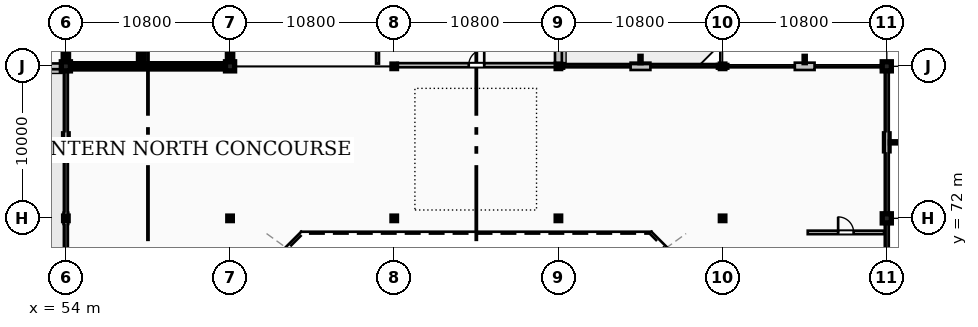
"""IFC4 building model, lengths in metres.
Left out: names, types, materials, properties, quantities, classifications, styles, units other than length and angle.
Written with IfcOpenShell. Run it as: python <this file> out.ifc"""

import sys

from ifc_helpers import new_model, si_unit, direction, frame, frame_2d, origin, origin_2d, place, context, subcontext, project, spatial, rectangle, hollow_rectangle, extrude, element, fill, save


model = new_model("IFC4")
c1 = context("Model", 3, precision=1e-05, world=origin(), true_north=direction((0.0, 1.0)))
c2 = subcontext(c1, "Body", "Model", "MODEL_VIEW")
j1 = project(units=[si_unit("LENGTHUNIT", "METRE"), si_unit("PLANEANGLEUNIT", "RADIAN")], contexts=[c1])
p1 = place(None, origin())
s1 = spatial("IfcSite", under=j1, at=p1, CompositionType="ELEMENT")
p2 = place(p1, origin())
s2 = spatial("IfcBuilding", under=s1, at=p2, CompositionType="ELEMENT")
p3 = place(p2, frame((0.0, 0.0, 24.0)))
s3 = spatial("IfcBuildingStorey", under=s2, at=p3, CompositionType="ELEMENT", Elevation=24.0)
p4 = place(p3, frame((54.0, 72.0, 0.0), z_axis=(0.0, 0.0, 1.0), x_axis=(1.0, 0.0, 0.0)))
e1 = element("IfcColumn", 1, at=p4, inside=s3, PredefinedType="COLUMN", context=c2, shape_type="SweptSolid", body=[
    extrude(hollow_rectangle(XDim=0.3, YDim=0.3, WallThickness=0.016, InnerFilletRadius=0.016, OuterFilletRadius=0.032, at=origin_2d()), origin(), (0.0, 0.0, 1.0), 4.8),
])
p5 = place(p3, frame((54.0, 82.0, 0.0), z_axis=(0.0, 0.0, 1.0), x_axis=(1.0, 0.0, 0.0)))
e2 = element("IfcColumn", 2, at=p5, inside=s3, PredefinedType="COLUMN", context=c2, shape_type="SweptSolid", body=[
    extrude(rectangle(XDim=0.6, YDim=0.6, at=origin_2d()), origin(), (0.0, 0.0, 1.0), 4.8),
])
p6 = place(p3, frame((64.8, 72.0, 0.0), z_axis=(0.0, 0.0, 1.0), x_axis=(1.0, 0.0, 0.0)))
e3 = element("IfcColumn", 3, at=p6, inside=s3, PredefinedType="COLUMN", context=c2, shape_type="SweptSolid", body=[
    extrude(hollow_rectangle(XDim=0.3, YDim=0.3, WallThickness=0.016, InnerFilletRadius=0.016, OuterFilletRadius=0.032, at=origin_2d()), origin(), (0.0, 0.0, 1.0), 4.8),
])
p7 = place(p3, frame((64.8, 82.0, 0.0), z_axis=(0.0, 0.0, 1.0), x_axis=(1.0, 0.0, 0.0)))
e4 = element("IfcColumn", 4, at=p7, inside=s3, PredefinedType="COLUMN", context=c2, shape_type="SweptSolid", body=[
    extrude(rectangle(XDim=0.6, YDim=0.6, at=origin_2d()), origin(), (0.0, 0.0, 1.0), 4.8),
])
for number, where, z_axis, x_axis in (
    (5, (75.6, 72.0, 0.0), (0.0, 0.0, 1.0), (1.0, 0.0, 0.0)),
    (6, (75.6, 82.0, 0.0), (0.0, 0.0, 1.0), (1.0, 0.0, 0.0)),
    (7, (86.4, 72.0, 0.0), (0.0, 0.0, 1.0), (1.0, 0.0, 0.0)),
    (8, (86.4, 82.0, 0.0), (0.0, 0.0, 1.0), (1.0, 0.0, 0.0)),
    (9, (97.2, 72.0, 0.0), (0.0, 0.0, 1.0), (1.0, 0.0, 0.0)),
    (10, (97.2, 82.0, 0.0), (0.0, 0.0, 1.0), (1.0, 0.0, 0.0)),
):
    element("IfcColumn", number, at=place(p3, frame(where, z_axis=z_axis, x_axis=x_axis)), inside=s3, PredefinedType="COLUMN", context=c2, shape_type="SweptSolid", body=[
        extrude(hollow_rectangle(XDim=0.3, YDim=0.3, WallThickness=0.016, InnerFilletRadius=0.016, OuterFilletRadius=0.032, at=origin_2d()), origin(), (0.0, 0.0, 1.0), 4.8),
    ])
for number, where, z_axis, x_axis in (
    (11, (108.0, 72.0, 0.0), (0.0, 0.0, 1.0), (1.0, 0.0, 0.0)),
    (12, (108.0, 82.0, 0.0), (0.0, 0.0, 1.0), (1.0, 0.0, 0.0)),
):
    element("IfcColumn", number, at=place(p3, frame(where, z_axis=z_axis, x_axis=x_axis)), inside=s3, PredefinedType="COLUMN", context=c2, shape_type="SweptSolid", body=[
        extrude(rectangle(XDim=0.6, YDim=0.6, at=origin_2d()), origin(), (0.0, 0.0, 1.0), 4.8),
    ])
p8 = place(p3, frame((103.25, 82.0, 0.0), z_axis=(0.0, 0.0, 1.0), x_axis=(-1.0, 0.0, 0.0)))
e13 = element("IfcWall", 13, at=p8, inside=s3, PredefinedType="STANDARD", context=c2, shape_type="SweptSolid", body=[
    extrude(rectangle(XDim=1.3, YDim=0.48, at=frame_2d((0.65, 0.0))), origin(), (0.0, 0.0, 1.0), 4.109),
])
for number, where, z_axis, x_axis in (
    (14, (107.855, 82.0, 0.0), (0.0, 0.0, 1.0), (-1.0, 0.0, 0.0)),
    (15, (97.57, 82.0, 0.0), (0.0, 0.0, 1.0), (-1.0, 0.0, 0.0)),
):
    element("IfcWall", number, at=place(p3, frame(where, z_axis=z_axis, x_axis=x_axis)), inside=s3, PredefinedType="STANDARD", context=c2, shape_type="SweptSolid", body=[
        extrude(rectangle(XDim=0.225, YDim=0.3, at=frame_2d((0.113, 0.0))), origin(), (0.0, 0.0, 1.0), 4.56),
    ])
p9 = place(p3, frame((92.45, 82.0, 0.0), z_axis=(0.0, 0.0, 1.0), x_axis=(-1.0, 0.0, 0.0)))
e16 = element("IfcWall", 16, at=p9, inside=s3, PredefinedType="STANDARD", context=c2, shape_type="SweptSolid", body=[
    extrude(rectangle(XDim=1.3, YDim=0.48, at=frame_2d((0.65, 0.0))), origin(), (0.0, 0.0, 1.0), 4.109),
])
p10 = place(p3, frame((97.055, 82.0, 0.0), z_axis=(0.0, 0.0, 1.0), x_axis=(-1.0, 0.0, 0.0)))
e17 = element("IfcWall", 17, at=p10, inside=s3, PredefinedType="STANDARD", context=c2, shape_type="SweptSolid", body=[
    extrude(rectangle(XDim=0.225, YDim=0.3, at=frame_2d((0.112, 0.0))), origin(), (0.0, 0.0, 1.0), 4.56),
])
p11 = place(p3, frame((86.77, 82.0, 0.0), z_axis=(0.0, 0.0, 1.0), x_axis=(-1.0, 0.0, 0.0)))
e18 = element("IfcWall", 18, at=p11, inside=s3, PredefinedType="STANDARD", context=c2, shape_type="SweptSolid", body=[
    extrude(rectangle(XDim=0.225, YDim=0.3, at=frame_2d((0.113, 0.0))), origin(), (0.0, 0.0, 1.0), 4.56),
])
p12 = place(p3, frame((86.4, 82.145, 0.0), z_axis=(0.0, 0.0, 1.0), x_axis=(0.0, 1.0, 0.0)))
e19 = element("IfcWall", 19, at=p12, inside=s3, PredefinedType="STANDARD", context=c2, shape_type="SweptSolid", body=[
    extrude(rectangle(XDim=9.71, YDim=0.45, at=frame_2d((4.855, 0.0))), origin(), (0.0, 0.0, 1.0), 4.56),
])
p13 = place(p12, frame((4.255, 0.0, 0.0)))
e20 = element("IfcOpeningElement", 20, at=p13, cuts=e19, PredefinedType="OPENING", context=c2, shape_type="SweptSolid", body=[
    extrude(rectangle(XDim=1.2, YDim=2.3, at=frame_2d((0.6, 1.15))), frame((0.0, 0.235, 0.0), z_axis=(0.0, -1.0, 0.0), x_axis=(1.0, 0.0, 0.0)), (0.0, 0.0, 1.0), 0.47),
])
p14 = place(p3, frame((43.345, 82.0, 0.0), z_axis=(0.0, 0.0, 1.0), x_axis=(1.0, 0.0, 0.0)))
e21 = element("IfcWall", 21, at=p14, inside=s3, PredefinedType="STANDARD", context=c2, shape_type="SweptSolid", body=[
    extrude(rectangle(XDim=10.51, YDim=0.38, at=frame_2d((5.255, 0.0))), origin(), (0.0, 0.0, 1.0), 4.17),
])
p15 = place(p14, frame((3.655, 0.0, 1.0)))
e22 = element("IfcOpeningElement", 22, at=p15, cuts=e21, PredefinedType="OPENING", context=c2, shape_type="SweptSolid", body=[
    extrude(rectangle(XDim=3.2, YDim=2.5, at=frame_2d((1.6, 1.25))), frame((0.0, 0.2, 0.0), z_axis=(0.0, -1.0, 0.0), x_axis=(1.0, 0.0, 0.0)), (0.0, 0.0, 1.0), 0.4),
])
p16 = place(p3, frame((54.0, 77.65, 0.0), z_axis=(0.0, 0.0, 1.0), x_axis=(0.0, -1.0, 0.0)))
e23 = element("IfcWall", 23, at=p16, inside=s3, PredefinedType="STANDARD", context=c2, shape_type="SweptSolid", body=[
    extrude(rectangle(XDim=1.3, YDim=0.48, at=frame_2d((0.65, 0.0))), origin(), (0.0, 0.0, 1.0), 4.109),
])
for number, where, z_axis, x_axis in (
    (24, (54.0, 81.855, 0.0), (0.0, 0.0, 1.0), (0.0, -1.0, 0.0)),
    (25, (54.0, 72.37, 0.0), (0.0, 0.0, 1.0), (0.0, -1.0, 0.0)),
    (26, (54.0, 71.855, 0.0), (0.0, 0.0, 1.0), (0.0, -1.0, 0.0)),
    (27, (108.0, 71.63, 0.0), (0.0, 0.0, 1.0), (0.0, 1.0, 0.0)),
):
    element("IfcWall", number, at=place(p3, frame(where, z_axis=z_axis, x_axis=x_axis)), inside=s3, PredefinedType="STANDARD", context=c2, shape_type="SweptSolid", body=[
        extrude(rectangle(XDim=0.225, YDim=0.3, at=frame_2d((0.113, 0.0))), origin(), (0.0, 0.0, 1.0), 4.56),
    ])
p17 = place(p3, frame((108.0, 76.35, 0.0), z_axis=(0.0, 0.0, 1.0), x_axis=(0.0, 1.0, 0.0)))
e28 = element("IfcWall", 28, at=p17, inside=s3, PredefinedType="STANDARD", context=c2, shape_type="SweptSolid", body=[
    extrude(rectangle(XDim=1.3, YDim=0.48, at=frame_2d((0.65, 0.0))), origin(), (0.0, 0.0, 1.0), 4.109),
])
for number, where, z_axis, x_axis in (
    (29, (108.0, 72.145, 0.0), (0.0, 0.0, 1.0), (0.0, 1.0, 0.0)),
    (30, (108.0, 81.63, 0.0), (0.0, 0.0, 1.0), (0.0, 1.0, 0.0)),
):
    element("IfcWall", number, at=place(p3, frame(where, z_axis=z_axis, x_axis=x_axis)), inside=s3, PredefinedType="STANDARD", context=c2, shape_type="SweptSolid", body=[
        extrude(rectangle(XDim=0.225, YDim=0.3, at=frame_2d((0.113, 0.0))), origin(), (0.0, 0.0, 1.0), 4.56),
    ])
for number, where, z_axis, x_axis in (
    (31, (54.0, 40.35, 4.6), (0.0, 0.0, 1.0), (0.0, 1.0, 0.0)),
    (32, (108.0, 40.35, 4.6), (0.0, 0.0, 1.0), (0.0, 1.0, 0.0)),
):
    element("IfcWall", number, at=place(p3, frame(where, z_axis=z_axis, x_axis=x_axis)), inside=s3, PredefinedType="PARAPET", context=c2, shape_type="SweptSolid", body=[
        extrude(rectangle(XDim=41.3, YDim=0.26, at=frame_2d((20.65, 0.0))), origin(), (0.0, 0.0, 1.0), 0.55),
    ])
p18 = place(p3, frame((54.3, 82.0, 0.0), z_axis=(0.0, 0.0, 1.0), x_axis=(1.0, 0.0, 0.0)))
e33 = element("IfcWall", 33, at=p18, inside=s3, PredefinedType="SHEAR", context=c2, shape_type="SweptSolid", body=[
    extrude(rectangle(XDim=10.2, YDim=0.35, at=frame_2d((5.1, 0.0))), origin(), (0.0, 0.0, 1.0), 4.56),
])
p19 = place(p3, frame((54.0, 82.3, 0.0), z_axis=(0.0, 0.0, 1.0), x_axis=(0.0, 1.0, 0.0)))
e34 = element("IfcWall", 34, at=p19, inside=s3, PredefinedType="SHEAR", context=c2, shape_type="SweptSolid", body=[
    extrude(rectangle(XDim=9.4, YDim=0.35, at=frame_2d((4.7, 0.0))), origin(), (0.0, 0.0, 1.0), 4.56),
])
p20 = place(p3, frame((64.8, 82.3, 0.0), z_axis=(0.0, 0.0, 1.0), x_axis=(0.0, 1.0, 0.0)))
e35 = element("IfcWall", 35, at=p20, inside=s3, PredefinedType="SHEAR", context=c2, shape_type="SweptSolid", body=[
    extrude(rectangle(XDim=9.4, YDim=0.35, at=frame_2d((4.7, 0.0))), origin(), (0.0, 0.0, 1.0), 4.56),
])
p21 = place(p20, frame((0.88, 0.0, 0.0)))
e36 = element("IfcOpeningElement", 36, at=p21, cuts=e35, PredefinedType="OPENING", context=c2, shape_type="SweptSolid", body=[
    extrude(rectangle(XDim=1.8, YDim=2.25, at=frame_2d((0.9, 1.125))), frame((0.0, 0.185, 0.0), z_axis=(0.0, -1.0, 0.0), x_axis=(1.0, 0.0, 0.0)), (0.0, 0.0, 1.0), 0.37),
])
p22 = place(p3, frame((58.95, 82.175, 0.0), z_axis=(0.0, 0.0, 1.0), x_axis=(0.0, 1.0, 0.0)))
e37 = element("IfcWall", 37, at=p22, inside=s3, PredefinedType="SHEAR", context=c2, shape_type="SweptSolid", body=[
    extrude(rectangle(XDim=9.65, YDim=0.35, at=frame_2d((4.825, 0.0))), origin(), (0.0, 0.0, 1.0), 4.56),
])
p23 = place(p22, frame((0.9, 0.0, 0.0)))
e38 = element("IfcOpeningElement", 38, at=p23, cuts=e37, PredefinedType="OPENING", context=c2, shape_type="SweptSolid", body=[
    extrude(rectangle(XDim=1.1, YDim=2.2, at=frame_2d((0.55, 1.1))), frame((0.0, 0.185, 0.0), z_axis=(0.0, -1.0, 0.0), x_axis=(1.0, 0.0, 0.0)), (0.0, 0.0, 1.0), 0.37),
])
p24 = place(p3, frame((102.8, 71.075, 0.0), z_axis=(0.0, 0.0, 1.0), x_axis=(1.0, 0.0, 0.0)))
e39 = element("IfcWall", 39, at=p24, inside=s3, PredefinedType="PARTITIONING", context=c2, shape_type="SweptSolid", body=[
    extrude(rectangle(XDim=5.02, YDim=0.23, at=frame_2d((2.51, 0.0))), origin(), (0.0, 0.0, 1.0), 4.52),
])
p25 = place(p24, frame((2.0, 0.0, 0.0)))
e40 = element("IfcOpeningElement", 40, at=p25, cuts=e39, PredefinedType="OPENING", context=c2, shape_type="SweptSolid", body=[
    extrude(rectangle(XDim=1.02, YDim=2.1, at=frame_2d((0.51, 1.05))), frame((0.0, 0.125, 0.0), z_axis=(0.0, -1.0, 0.0), x_axis=(1.0, 0.0, 0.0)), (0.0, 0.0, 1.0), 0.25),
])
p26 = place(p3, frame((75.8, 82.075, 0.0), z_axis=(0.0, 0.0, 1.0), x_axis=(1.0, 0.0, 0.0)))
e41 = element("IfcWall", 41, at=p26, inside=s3, PredefinedType="PARTITIONING", context=c2, shape_type="SweptSolid", body=[
    extrude(rectangle(XDim=10.42, YDim=0.27, at=frame_2d((5.21, 0.0))), origin(), (0.0, 0.0, 1.0), 4.16),
])
p27 = place(p26, frame((4.7, 0.0, 0.0)))
e42 = element("IfcOpeningElement", 42, at=p27, cuts=e41, PredefinedType="OPENING", context=c2, shape_type="SweptSolid", body=[
    extrude(rectangle(XDim=1.02, YDim=2.15, at=frame_2d((0.51, 1.075))), frame((0.0, 0.145, 0.0), z_axis=(0.0, -1.0, 0.0), x_axis=(1.0, 0.0, 0.0)), (0.0, 0.0, 1.0), 0.29),
])
p28 = place(p3, frame((74.5, 82.18, 0.0), z_axis=(0.0, 0.0, 1.0), x_axis=(0.0, 1.0, 0.0)))
e43 = element("IfcWall", 43, at=p28, inside=s3, PredefinedType="PARTITIONING", context=c2, shape_type="SweptSolid", body=[
    extrude(rectangle(XDim=4.62, YDim=0.19, at=frame_2d((2.31, 0.0))), origin(), (0.0, 0.0, 1.0), 4.52),
])
p29 = place(p28, frame((1.485, 0.0, 0.0)))
e44 = element("IfcOpeningElement", 44, at=p29, cuts=e43, PredefinedType="OPENING", context=c2, shape_type="SweptSolid", body=[
    extrude(rectangle(XDim=1.65, YDim=2.4, at=frame_2d((0.825, 1.2))), frame((0.0, 0.105, 0.0), z_axis=(0.0, -1.0, 0.0), x_axis=(1.0, 0.0, 0.0)), (0.0, 0.0, 1.0), 0.21),
])
p30 = place(p25, origin())
e45 = element("IfcDoor", 45, at=p30, inside=s3, OperationType="SINGLE_SWING_LEFT", PredefinedType="DOOR", context=c2, shape_type="SweptSolid", body=[
    extrude(rectangle(XDim=1.02, YDim=2.1, at=frame_2d((0.51, 1.05))), frame((0.0, 0.025, 0.0), z_axis=(0.0, -1.0, 0.0), x_axis=(1.0, 0.0, 0.0)), (0.0, 0.0, 1.0), 0.05),
])
fill(e40, e45)
p31 = place(p27, origin())
e46 = element("IfcDoor", 46, at=p31, inside=s3, OperationType="SINGLE_SWING_RIGHT", PredefinedType="DOOR", context=c2, shape_type="SweptSolid", body=[
    extrude(rectangle(XDim=1.02, YDim=2.15, at=frame_2d((0.51, 1.075))), frame((0.0, 0.025, 0.0), z_axis=(0.0, -1.0, 0.0), x_axis=(1.0, 0.0, 0.0)), (0.0, 0.0, 1.0), 0.05),
])
fill(e42, e46)
save(model, sys.argv[1])
